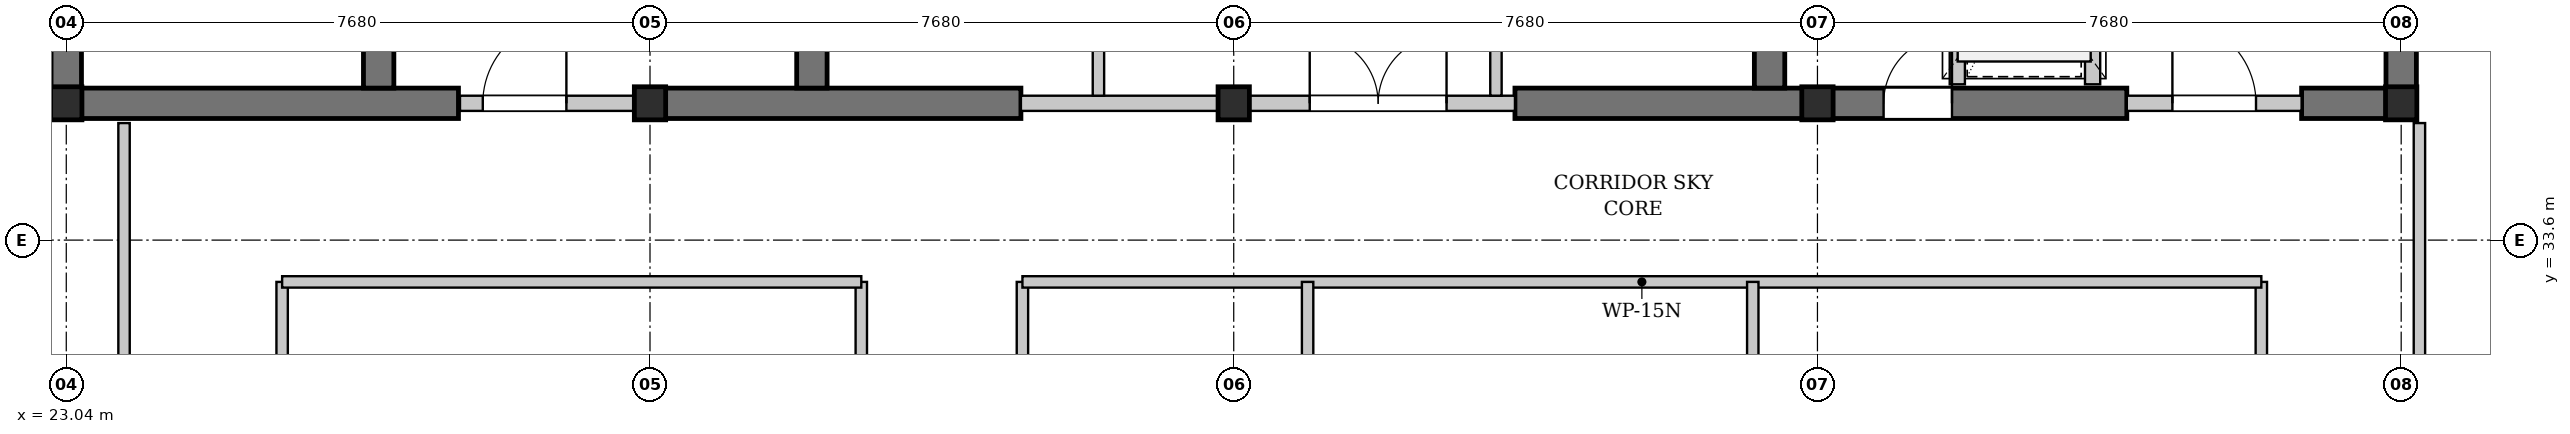
"""IFC4 building model, lengths in metres.
Left out: names, types, materials, properties, quantities, classifications, styles, units other than length and angle.
Written with IfcOpenShell. Run it as: python <this file> out.ifc"""

import sys

from ifc_helpers import new_model, si_unit, direction, frame, frame_2d, origin, origin_2d, place, context, subcontext, project, spatial, rectangle, i_section, extrude, element, fill, save


model = new_model("IFC4")
c1 = context("Model", 3, precision=1e-05, world=origin(), true_north=direction((0.0, 1.0)))
c2 = subcontext(c1, "Body", "Model", "MODEL_VIEW")
j1 = project(units=[si_unit("LENGTHUNIT", "METRE"), si_unit("PLANEANGLEUNIT", "RADIAN")], contexts=[c1])
p1 = place(None, origin())
s1 = spatial("IfcSite", under=j1, at=p1, CompositionType="ELEMENT")
p2 = place(p1, origin())
s2 = spatial("IfcBuilding", under=s1, at=p2, CompositionType="ELEMENT")
p3 = place(p2, frame((0.0, 0.0, 211.1)))
s3 = spatial("IfcBuildingStorey", under=s2, at=p3, CompositionType="ELEMENT", Elevation=211.1)
p4 = place(p3, frame((22.84, 35.4, 0.0), z_axis=(0.0, 0.0, 1.0), x_axis=(1.0, 0.0, 0.0)))
e1 = element("IfcWall", 1, at=p4, inside=s3, PredefinedType="SHEAR", context=c2, shape_type="SweptSolid", body=[
    extrude(rectangle(XDim=5.36, YDim=0.4, at=frame_2d((2.68, 0.0))), origin(), (0.0, 0.0, 1.0), 3.08),
])
p5 = place(p3, frame((30.72, 35.4, 0.0), z_axis=(0.0, 0.0, 1.0), x_axis=(1.0, 0.0, 0.0)))
e2 = element("IfcWall", 2, at=p5, inside=s3, PredefinedType="SHEAR", context=c2, shape_type="SweptSolid", body=[
    extrude(rectangle(XDim=4.88, YDim=0.4, at=frame_2d((2.44, 0.0))), origin(), (0.0, 0.0, 1.0), 3.08),
])
p6 = place(p3, frame((42.1, 35.4, 0.0), z_axis=(0.0, 0.0, 1.0), x_axis=(1.0, 0.0, 0.0)))
e3 = element("IfcWall", 3, at=p6, inside=s3, PredefinedType="SHEAR", context=c2, shape_type="SweptSolid", body=[
    extrude(rectangle(XDim=8.05, YDim=0.4, at=frame_2d((4.025, 0.0))), origin(), (0.0, 0.0, 1.0), 3.08),
])
p7 = place(p6, frame((4.85, 0.0, 0.0)))
e4 = element("IfcOpeningElement", 4, at=p7, cuts=e3, PredefinedType="OPENING", context=c2, shape_type="SweptSolid", body=[
    extrude(rectangle(XDim=0.9, YDim=2.15, at=frame_2d((0.45, 1.075))), frame((0.0, 0.21, 0.0), z_axis=(0.0, -1.0, 0.0), x_axis=(1.0, 0.0, 0.0)), (0.0, 0.0, 1.0), 0.42),
])
p8 = place(p3, frame((52.45, 35.4, 0.0), z_axis=(0.0, 0.0, 1.0), x_axis=(1.0, 0.0, 0.0)))
e5 = element("IfcWall", 5, at=p8, inside=s3, PredefinedType="SHEAR", context=c2, shape_type="SweptSolid", body=[
    extrude(rectangle(XDim=1.51, YDim=0.4, at=frame_2d((0.755, 0.0))), origin(), (0.0, 0.0, 1.0), 3.08),
])
p9 = place(p3, frame((23.04, 35.6, 0.0), z_axis=(0.0, 0.0, 1.0), x_axis=(0.0, 1.0, 0.0)))
e6 = element("IfcWall", 6, at=p9, inside=s3, PredefinedType="SHEAR", context=c2, shape_type="SweptSolid", body=[
    extrude(rectangle(XDim=10.4, YDim=0.4, at=frame_2d((5.2, 0.0))), origin(), (0.0, 0.0, 1.0), 3.08),
])
p10 = place(p3, frame((27.15, 35.6, 0.0), z_axis=(0.0, 0.0, 1.0), x_axis=(0.0, 1.0, 0.0)))
e7 = element("IfcWall", 7, at=p10, inside=s3, PredefinedType="SHEAR", context=c2, shape_type="SweptSolid", body=[
    extrude(rectangle(XDim=10.4, YDim=0.4, at=frame_2d((5.2, 0.0))), origin(), (0.0, 0.0, 1.0), 3.08),
])
p11 = place(p10, frame((0.7, 0.0, 0.0)))
e8 = element("IfcOpeningElement", 8, at=p11, cuts=e7, PredefinedType="OPENING", context=c2, shape_type="SweptSolid", body=[
    extrude(rectangle(XDim=1.1, YDim=2.15, at=frame_2d((0.55, 1.075))), frame((0.0, 0.21, 0.0), z_axis=(0.0, -1.0, 0.0), x_axis=(1.0, 0.0, 0.0)), (0.0, 0.0, 1.0), 0.42),
])
for number, where, z_axis, x_axis in (
    (9, (32.85, 35.6, 0.0), (0.0, 0.0, 1.0), (0.0, 1.0, 0.0)),
    (10, (45.45, 35.6, 0.0), (0.0, 0.0, 1.0), (0.0, 1.0, 0.0)),
    (11, (53.76, 35.6, 0.0), (0.0, 0.0, 1.0), (0.0, 1.0, 0.0)),
):
    element("IfcWall", number, at=place(p3, frame(where, z_axis=z_axis, x_axis=x_axis)), inside=s3, PredefinedType="SHEAR", context=c2, shape_type="SweptSolid", body=[
        extrude(rectangle(XDim=10.4, YDim=0.4, at=frame_2d((5.2, 0.0))), origin(), (0.0, 0.0, 1.0), 3.08),
    ])
for number, where, z_axis, x_axis in (
    (12, (23.04, 35.4, 0.0), (0.0, 0.0, 1.0), (1.0, 0.0, 0.0)),
    (13, (30.72, 35.4, 0.0), (0.0, 0.0, 1.0), (1.0, 0.0, 0.0)),
    (14, (38.4, 35.4, 0.0), (0.0, 0.0, 1.0), (1.0, 0.0, 0.0)),
    (15, (46.08, 35.4, 0.0), (0.0, 0.0, 1.0), (1.0, 0.0, 0.0)),
    (16, (53.76, 35.4, 0.0), (0.0, 0.0, 1.0), (1.0, 0.0, 0.0)),
):
    element("IfcColumn", number, at=place(p3, frame(where, z_axis=z_axis, x_axis=x_axis)), inside=s3, PredefinedType="COLUMN", context=c2, shape_type="SweptSolid", body=[
        extrude(i_section(OverallWidth=0.412, OverallDepth=0.435, WebThickness=0.036, FlangeThickness=0.058, FilletRadius=0.015, at=origin_2d()), origin(), (0.0, 0.0, 1.0), 3.3),
    ])
p12 = place(p3, frame((28.22, 35.4, 0.0), z_axis=(0.0, 0.0, 1.0), x_axis=(1.0, 0.0, 0.0)))
e17 = element("IfcWall", 17, at=p12, inside=s3, PredefinedType="PARTITIONING", context=c2, shape_type="SweptSolid", body=[
    extrude(rectangle(XDim=2.5, YDim=0.2, at=frame_2d((1.25, 0.0))), origin(), (0.0, 0.0, 1.0), 2.313),
])
p13 = place(p12, frame((0.3, 0.0, 0.0)))
e18 = element("IfcOpeningElement", 18, at=p13, cuts=e17, PredefinedType="OPENING", context=c2, shape_type="SweptSolid", body=[
    extrude(rectangle(XDim=1.1, YDim=2.15, at=frame_2d((0.55, 1.075))), frame((0.0, 0.11, 0.0), z_axis=(0.0, -1.0, 0.0), x_axis=(1.0, 0.0, 0.0)), (0.0, 0.0, 1.0), 0.22),
])
p14 = place(p3, frame((35.6, 35.4, 0.0), z_axis=(0.0, 0.0, 1.0), x_axis=(1.0, 0.0, 0.0)))
e19 = element("IfcWall", 19, at=p14, inside=s3, PredefinedType="PARTITIONING", context=c2, shape_type="SweptSolid", body=[
    extrude(rectangle(XDim=6.5, YDim=0.2, at=frame_2d((3.25, 0.0))), origin(), (0.0, 0.0, 1.0), 2.313),
])
p15 = place(p14, frame((3.8, 0.0, 0.0)))
e20 = element("IfcOpeningElement", 20, at=p15, cuts=e19, PredefinedType="OPENING", context=c2, shape_type="SweptSolid", body=[
    extrude(rectangle(XDim=1.8, YDim=2.3, at=frame_2d((0.9, 1.15))), frame((0.0, 0.11, 0.0), z_axis=(0.0, -1.0, 0.0), x_axis=(1.0, 0.0, 0.0)), (0.0, 0.0, 1.0), 0.22),
])
p16 = place(p3, frame((36.62, 35.5, 0.0), z_axis=(0.0, 0.0, 1.0), x_axis=(0.0, 1.0, 0.0)))
e21 = element("IfcWall", 21, at=p16, inside=s3, PredefinedType="PARTITIONING", context=c2, shape_type="SweptSolid", body=[
    extrude(rectangle(XDim=10.42, YDim=0.15, at=frame_2d((5.21, 0.0))), origin(), (0.0, 0.0, 1.0), 3.08),
])
p17 = place(p16, frame((3.92, 0.0, 0.0)))
e22 = element("IfcOpeningElement", 22, at=p17, cuts=e21, PredefinedType="OPENING", context=c2, shape_type="SweptSolid", body=[
    extrude(rectangle(XDim=0.9, YDim=2.15, at=frame_2d((0.45, 1.075))), frame((0.0, 0.085, 0.0), z_axis=(0.0, -1.0, 0.0), x_axis=(1.0, 0.0, 0.0)), (0.0, 0.0, 1.0), 0.17),
])
p18 = place(p16, frame((5.85, 0.0, 0.0)))
e23 = element("IfcOpeningElement", 23, at=p18, cuts=e21, PredefinedType="OPENING", context=c2, shape_type="SweptSolid", body=[
    extrude(rectangle(XDim=0.9, YDim=2.15, at=frame_2d((0.45, 1.075))), frame((0.0, 0.085, 0.0), z_axis=(0.0, -1.0, 0.0), x_axis=(1.0, 0.0, 0.0)), (0.0, 0.0, 1.0), 0.17),
])
p19 = place(p3, frame((41.85, 35.5, 0.0), z_axis=(0.0, 0.0, 1.0), x_axis=(0.0, 1.0, 0.0)))
e24 = element("IfcWall", 24, at=p19, inside=s3, PredefinedType="PARTITIONING", context=c2, shape_type="SweptSolid", body=[
    extrude(rectangle(XDim=10.42, YDim=0.15, at=frame_2d((5.21, 0.0))), origin(), (0.0, 0.0, 1.0), 3.08),
])
p20 = place(p19, frame((3.92, 0.0, 0.0)))
e25 = element("IfcOpeningElement", 25, at=p20, cuts=e24, PredefinedType="OPENING", context=c2, shape_type="SweptSolid", body=[
    extrude(rectangle(XDim=0.9, YDim=2.15, at=frame_2d((0.45, 1.075))), frame((0.0, 0.085, 0.0), z_axis=(0.0, -1.0, 0.0), x_axis=(1.0, 0.0, 0.0)), (0.0, 0.0, 1.0), 0.17),
])
p21 = place(p19, frame((5.85, 0.0, 0.0)))
e26 = element("IfcOpeningElement", 26, at=p21, cuts=e24, PredefinedType="OPENING", context=c2, shape_type="SweptSolid", body=[
    extrude(rectangle(XDim=0.9, YDim=2.15, at=frame_2d((0.45, 1.075))), frame((0.0, 0.085, 0.0), z_axis=(0.0, -1.0, 0.0), x_axis=(1.0, 0.0, 0.0)), (0.0, 0.0, 1.0), 0.17),
])
p22 = place(p3, frame((50.15, 35.4, 0.0), z_axis=(0.0, 0.0, 1.0), x_axis=(1.0, 0.0, 0.0)))
e27 = element("IfcWall", 27, at=p22, inside=s3, PredefinedType="PARTITIONING", context=c2, shape_type="SweptSolid", body=[
    extrude(rectangle(XDim=2.3, YDim=0.2, at=frame_2d((1.15, 0.0))), origin(), (0.0, 0.0, 1.0), 2.313),
])
p23 = place(p22, frame((0.6, 0.0, 0.0)))
e28 = element("IfcOpeningElement", 28, at=p23, cuts=e27, PredefinedType="OPENING", context=c2, shape_type="SweptSolid", body=[
    extrude(rectangle(XDim=1.1, YDim=2.15, at=frame_2d((0.55, 1.075))), frame((0.0, 0.11, 0.0), z_axis=(0.0, -1.0, 0.0), x_axis=(1.0, 0.0, 0.0)), (0.0, 0.0, 1.0), 0.22),
])
p24 = place(p3, frame((49.7, 35.65, 0.0), z_axis=(0.0, 0.0, 1.0), x_axis=(0.0, 1.0, 0.0)))
e29 = element("IfcWall", 29, at=p24, inside=s3, PredefinedType="PARTITIONING", context=c2, shape_type="SweptSolid", body=[
    extrude(rectangle(XDim=3.15, YDim=0.2, at=frame_2d((1.575, 0.0))), origin(), (0.0, 0.0, 1.0), 3.08),
])
p25 = place(p24, frame((0.85, 0.0, 0.0)))
e30 = element("IfcOpeningElement", 30, at=p25, cuts=e29, PredefinedType="OPENING", context=c2, shape_type="SweptSolid", body=[
    extrude(rectangle(XDim=1.2, YDim=2.2, at=frame_2d((0.6, 1.1))), frame((0.0, 0.11, 0.0), z_axis=(0.0, -1.0, 0.0), x_axis=(1.0, 0.0, 0.0)), (0.0, 0.0, 1.0), 0.22),
])
p26 = place(p3, frame((47.92, 35.65, 0.0), z_axis=(0.0, 0.0, 1.0), x_axis=(0.0, 1.0, 0.0)))
e31 = element("IfcWall", 31, at=p26, inside=s3, PredefinedType="PARTITIONING", context=c2, shape_type="SweptSolid", body=[
    extrude(rectangle(XDim=3.15, YDim=0.2, at=frame_2d((1.575, 0.0))), origin(), (0.0, 0.0, 1.0), 3.08),
])
p27 = place(p3, frame((23.8, 19.65, 0.0), z_axis=(0.0, 0.0, 1.0), x_axis=(0.0, 1.0, 0.0)))
e32 = element("IfcWall", 32, at=p27, inside=s3, PredefinedType="PARTITIONING", context=c2, shape_type="SweptSolid", body=[
    extrude(rectangle(XDim=15.49, YDim=0.15, at=frame_2d((7.745, 0.0))), origin(), (0.0, 0.0, 1.0), 3.08),
])
p28 = place(p27, frame((1.03, 0.0, 0.0)))
e33 = element("IfcOpeningElement", 33, at=p28, cuts=e32, PredefinedType="OPENING", context=c2, shape_type="SweptSolid", body=[
    extrude(rectangle(XDim=0.9, YDim=2.15, at=frame_2d((0.45, 1.075))), frame((0.0, 0.085, 0.0), z_axis=(0.0, -1.0, 0.0), x_axis=(1.0, 0.0, 0.0)), (0.0, 0.0, 1.0), 0.17),
])
p29 = place(p3, frame((54.0, 19.65, 0.0), z_axis=(0.0, 0.0, 1.0), x_axis=(0.0, 1.0, 0.0)))
e34 = element("IfcWall", 34, at=p29, inside=s3, PredefinedType="PARTITIONING", context=c2, shape_type="SweptSolid", body=[
    extrude(rectangle(XDim=15.49, YDim=0.15, at=frame_2d((7.745, 0.0))), origin(), (0.0, 0.0, 1.0), 3.08),
])
p30 = place(p29, frame((1.03, 0.0, 0.0)))
e35 = element("IfcOpeningElement", 35, at=p30, cuts=e34, PredefinedType="OPENING", context=c2, shape_type="SweptSolid", body=[
    extrude(rectangle(XDim=0.9, YDim=2.15, at=frame_2d((0.45, 1.075))), frame((0.0, 0.085, 0.0), z_axis=(0.0, -1.0, 0.0), x_axis=(1.0, 0.0, 0.0)), (0.0, 0.0, 1.0), 0.17),
])
for number, where, z_axis, x_axis in (
    (36, (25.88, 21.73, 0.0), (0.0, 0.0, 1.0), (0.0, 1.0, 0.0)),
    (37, (51.92, 21.73, 0.0), (0.0, 0.0, 1.0), (0.0, 1.0, 0.0)),
    (38, (33.5, 21.73, 0.0), (0.0, 0.0, 1.0), (0.0, 1.0, 0.0)),
    (39, (35.62, 21.73, 0.0), (0.0, 0.0, 1.0), (0.0, 1.0, 0.0)),
):
    element("IfcWall", number, at=place(p3, frame(where, z_axis=z_axis, x_axis=x_axis)), inside=s3, PredefinedType="PARTITIONING", context=c2, shape_type="SweptSolid", body=[
        extrude(rectangle(XDim=11.32, YDim=0.15, at=frame_2d((5.66, 0.0))), origin(), (0.0, 0.0, 1.0), 3.08),
    ])
p31 = place(p3, frame((25.88, 33.05, 0.0), z_axis=(0.0, 0.0, 1.0), x_axis=(1.0, 0.0, 0.0)))
e40 = element("IfcWall", 40, at=p31, inside=s3, PredefinedType="PARTITIONING", context=c2, shape_type="SweptSolid", body=[
    extrude(rectangle(XDim=7.62, YDim=0.15, at=frame_2d((3.81, 0.0))), origin(), (0.0, 0.0, 1.0), 3.08),
])
p32 = place(p3, frame((35.62, 33.05, 0.0), z_axis=(0.0, 0.0, 1.0), x_axis=(1.0, 0.0, 0.0)))
e41 = element("IfcWall", 41, at=p32, inside=s3, PredefinedType="PARTITIONING", context=c2, shape_type="SweptSolid", body=[
    extrude(rectangle(XDim=16.3, YDim=0.15, at=frame_2d((8.15, 0.0))), origin(), (0.0, 0.0, 1.0), 3.08),
])
for number, where, z_axis, x_axis in (
    (42, (39.372, 21.73, 0.0), (0.0, 0.0, 1.0), (0.0, 1.0, 0.0)),
    (43, (45.229, 21.73, 0.0), (0.0, 0.0, 1.0), (0.0, 1.0, 0.0)),
):
    element("IfcWall", number, at=place(p3, frame(where, z_axis=z_axis, x_axis=x_axis)), inside=s3, PredefinedType="PARTITIONING", context=c2, shape_type="SweptSolid", body=[
        extrude(rectangle(XDim=11.32, YDim=0.15, at=frame_2d((5.66, 0.0))), origin(), (0.0, 0.0, 1.0), 3.08),
    ])
p33 = place(p13, origin())
e44 = element("IfcDoor", 44, at=p33, inside=s3, OperationType="SINGLE_SWING_RIGHT", PredefinedType="DOOR", context=c2, shape_type="SweptSolid", body=[
    extrude(rectangle(XDim=1.1, YDim=2.15, at=frame_2d((0.55, 1.075))), frame((0.0, 0.025, 0.0), z_axis=(0.0, -1.0, 0.0), x_axis=(1.0, 0.0, 0.0)), (0.0, 0.0, 1.0), 0.05),
])
fill(e18, e44)
p34 = place(p15, origin())
e45 = element("IfcDoor", 45, at=p34, inside=s3, OperationType="DOUBLE_DOOR_SINGLE_SWING", PredefinedType="DOOR", context=c2, shape_type="SweptSolid", body=[
    extrude(rectangle(XDim=1.8, YDim=2.3, at=frame_2d((0.9, 1.15))), frame((0.0, 0.025, 0.0), z_axis=(0.0, -1.0, 0.0), x_axis=(1.0, 0.0, 0.0)), (0.0, 0.0, 1.0), 0.05),
])
fill(e20, e45)
p35 = place(p23, origin())
e46 = element("IfcDoor", 46, at=p35, inside=s3, OperationType="SINGLE_SWING_LEFT", PredefinedType="DOOR", context=c2, shape_type="SweptSolid", body=[
    extrude(rectangle(XDim=1.1, YDim=2.15, at=frame_2d((0.55, 1.075))), frame((0.0, 0.025, 0.0), z_axis=(0.0, -1.0, 0.0), x_axis=(1.0, 0.0, 0.0)), (0.0, 0.0, 1.0), 0.05),
])
fill(e28, e46)
p36 = place(p7, origin())
e47 = element("IfcDoor", 47, at=p36, inside=s3, OperationType="SINGLE_SWING_RIGHT", PredefinedType="DOOR", context=c2, shape_type="SweptSolid", body=[
    extrude(rectangle(XDim=0.9, YDim=2.15, at=frame_2d((0.45, 1.075))), frame((0.0, 0.025, 0.0), z_axis=(0.0, -1.0, 0.0), x_axis=(1.0, 0.0, 0.0)), (0.0, 0.0, 1.0), 0.05),
])
fill(e4, e47)
save(model, sys.argv[1])
